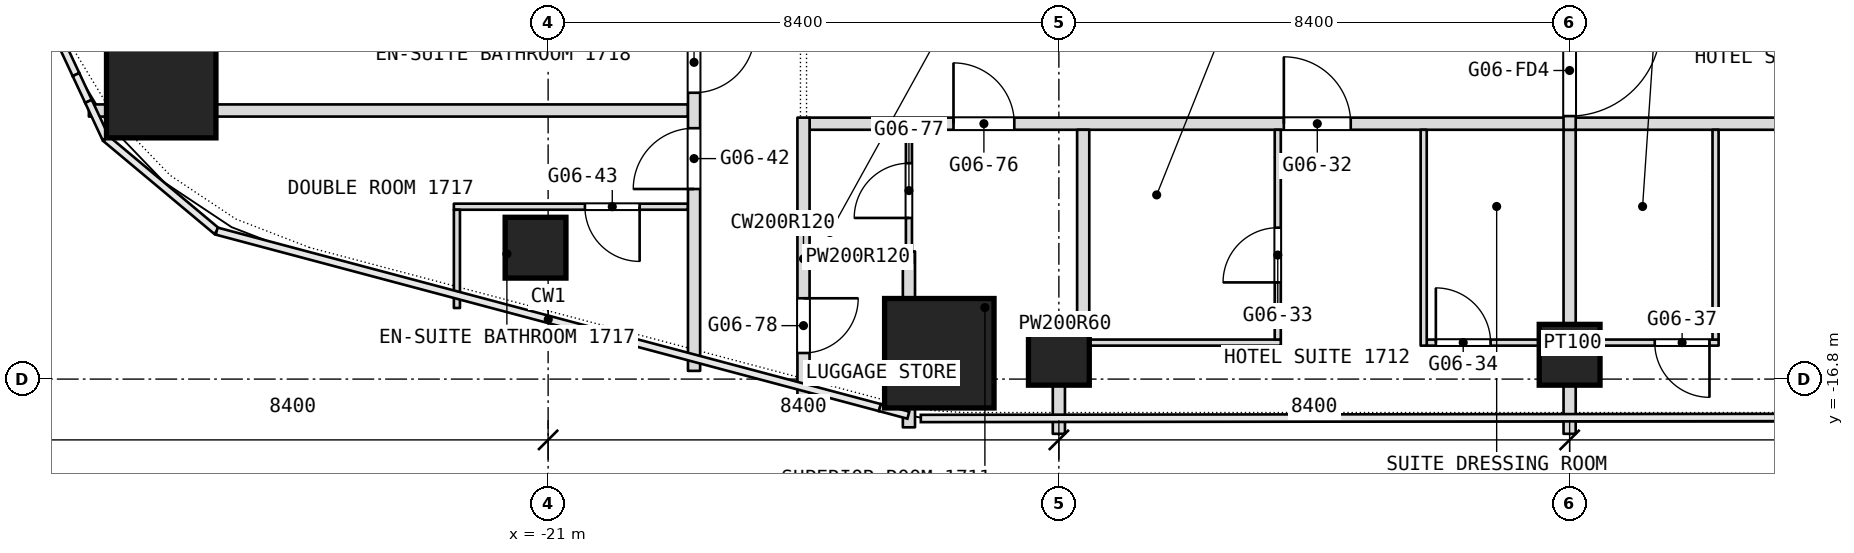
"""IFC4 building model, lengths in metres.
Left out: names, types, materials, properties, quantities, classifications, styles, units other than length and angle.
Written with IfcOpenShell. Run it as: python <this file> out.ifc"""

import sys

from ifc_helpers import new_model, si_unit, direction, frame, frame_2d, origin, origin_2d, place, context, subcontext, project, spatial, rectangle, extrude, element, fill, save


model = new_model("IFC4")
c1 = context("Model", 3, precision=1e-05, world=origin(), true_north=direction((0.0, 1.0)))
c2 = subcontext(c1, "Body", "Model", "MODEL_VIEW")
j1 = project(units=[si_unit("LENGTHUNIT", "METRE"), si_unit("PLANEANGLEUNIT", "RADIAN")], contexts=[c1])
p1 = place(None, origin())
s1 = spatial("IfcSite", under=j1, at=p1, CompositionType="ELEMENT")
p2 = place(p1, origin())
s2 = spatial("IfcBuilding", under=s1, at=p2, CompositionType="ELEMENT")
p3 = place(p2, frame((0.0, 0.0, 76.1)))
s3 = spatial("IfcBuildingStorey", under=s2, at=p3, CompositionType="ELEMENT", Elevation=76.1)
for number, where, z_axis, x_axis in (
    (1, (-27.363, -11.933, 0.0), (0.0, 0.0, 1.0), (1.0, 0.0, 0.0)),
    (2, (-14.566, -16.375, 0.0), (0.0, 0.0, 1.0), (1.0, 0.0, 0.0)),
):
    element("IfcColumn", number, at=place(p3, frame(where, z_axis=z_axis, x_axis=x_axis)), inside=s3, PredefinedType="COLUMN", context=c2, shape_type="SweptSolid", body=[
        extrude(rectangle(XDim=1.8, YDim=1.8, at=origin_2d()), origin(), (0.0, 0.0, 1.0), 3.6),
    ])
for number, where, z_axis, x_axis in (
    (3, (-4.2, -16.4, 0.0), (0.0, 0.0, 1.0), (1.0, 0.0, 0.0)),
    (4, (-12.6, -16.4, 0.0), (0.0, 0.0, 1.0), (1.0, 0.0, 0.0)),
    (5, (-21.207, -14.639, 0.0), (0.0, 0.0, 1.0), (1.0, 0.0, 0.0)),
):
    element("IfcColumn", number, at=place(p3, frame(where, z_axis=z_axis, x_axis=x_axis)), inside=s3, PredefinedType="COLUMN", context=c2, shape_type="SweptSolid", body=[
        extrude(rectangle(XDim=1.0, YDim=1.0, at=origin_2d()), origin(), (0.0, 0.0, 1.0), 3.6),
    ])
p4 = place(p3, frame((-12.5, -16.2, 0.0), z_axis=(0.0, 0.0, 1.0), x_axis=(1.0, 0.0, 0.0)))
e6 = element("IfcWall", 6, at=p4, inside=s3, PredefinedType="PARTITIONING", context=c2, shape_type="SweptSolid", body=[
    extrude(rectangle(XDim=3.55, YDim=0.1, at=frame_2d((1.775, 0.0))), origin(), (0.0, 0.0, 1.0), 2.94),
])
p5 = place(p3, frame((-6.55, -16.2, 0.0), z_axis=(0.0, 0.0, 1.0), x_axis=(1.0, 0.0, 0.0)))
e7 = element("IfcWall", 7, at=p5, inside=s3, PredefinedType="PARTITIONING", context=c2, shape_type="SweptSolid", body=[
    extrude(rectangle(XDim=4.8, YDim=0.1, at=frame_2d((2.4, 0.0))), origin(), (0.0, 0.0, 1.0), 2.94),
])
p6 = place(p5, frame((0.15, 0.0, 0.0)))
e8 = element("IfcOpeningElement", 8, at=p6, cuts=e7, PredefinedType="OPENING", context=c2, shape_type="SweptSolid", body=[
    extrude(rectangle(XDim=0.9, YDim=2.1, at=frame_2d((0.45, 1.05))), frame((0.0, 0.05, 0.0), z_axis=(0.0, -1.0, 0.0), x_axis=(1.0, 0.0, 0.0)), (0.0, 0.0, 1.0), 0.1),
])
p7 = place(p5, frame((3.75, 0.0, 0.0)))
e9 = element("IfcOpeningElement", 9, at=p7, cuts=e7, PredefinedType="OPENING", context=c2, shape_type="SweptSolid", body=[
    extrude(rectangle(XDim=0.9, YDim=2.1, at=frame_2d((0.45, 1.05))), frame((0.0, 0.05, 0.0), z_axis=(0.0, -1.0, 0.0), x_axis=(1.0, 0.0, 0.0)), (0.0, 0.0, 1.0), 0.1),
])
p8 = place(p3, frame((-12.7, -15.9, 0.0), z_axis=(0.0, 0.0, 1.0), x_axis=(1.0, 0.0, 0.0)))
e10 = element("IfcWall", 10, at=p8, inside=s3, PredefinedType="PARTITIONING", context=c2, shape_type="SweptSolid", body=[
    extrude(rectangle(XDim=0.4, YDim=0.2, at=frame_2d((0.2, 0.0))), origin(), (0.0, 0.0, 1.0), 3.34),
])
p9 = place(p3, frame((-16.7, -14.8, 0.0), z_axis=(0.0, 0.0, 1.0), x_axis=(1.0, 0.0, 0.0)))
e11 = element("IfcWall", 11, at=p9, inside=s3, PredefinedType="PARTITIONING", context=c2, shape_type="SweptSolid", body=[
    extrude(rectangle(XDim=1.584, YDim=0.2, at=frame_2d((0.792, 0.0))), origin(), (0.0, 0.0, 1.0), 3.34),
])
p10 = place(p3, frame((-22.55, -13.965, 0.0), z_axis=(0.0, 0.0, 1.0), x_axis=(1.0, 0.0, 0.0)))
e12 = element("IfcWall", 12, at=p10, inside=s3, PredefinedType="PARTITIONING", context=c2, shape_type="SweptSolid", body=[
    extrude(rectangle(XDim=3.85, YDim=0.1, at=frame_2d((1.925, 0.0))), origin(), (0.0, 0.0, 1.0), 3.34),
])
p11 = place(p10, frame((2.155, 0.0, 0.0)))
e13 = element("IfcOpeningElement", 13, at=p11, cuts=e12, PredefinedType="OPENING", context=c2, shape_type="SweptSolid", body=[
    extrude(rectangle(XDim=0.9, YDim=2.1, at=frame_2d((0.45, 1.05))), frame((0.0, 0.05, 0.0), z_axis=(0.0, -1.0, 0.0), x_axis=(1.0, 0.0, 0.0)), (0.0, 0.0, 1.0), 0.1),
])
p12 = place(p3, frame((-16.7, -12.6, 0.0), z_axis=(0.0, 0.0, 1.0), x_axis=(1.0, 0.0, 0.0)))
e14 = element("IfcWall", 14, at=p12, inside=s3, PredefinedType="PARTITIONING", context=c2, shape_type="SweptSolid", body=[
    extrude(rectangle(XDim=33.4, YDim=0.2, at=frame_2d((16.7, 0.0))), origin(), (0.0, 0.0, 1.0), 3.34),
])
p13 = place(p12, frame((7.8, 0.0, 0.0)))
e15 = element("IfcOpeningElement", 15, at=p13, cuts=e14, PredefinedType="OPENING", context=c2, shape_type="SweptSolid", body=[
    extrude(rectangle(XDim=1.1, YDim=2.1, at=frame_2d((0.55, 1.05))), frame((0.0, 0.1, 0.0), z_axis=(0.0, -1.0, 0.0), x_axis=(1.0, 0.0, 0.0)), (0.0, 0.0, 1.0), 0.2),
])
p14 = place(p12, frame((16.1, 0.0, 0.0)))
e16 = element("IfcOpeningElement", 16, at=p14, cuts=e14, PredefinedType="OPENING", context=c2, shape_type="SweptSolid", body=[
    extrude(rectangle(XDim=1.1, YDim=2.1, at=frame_2d((0.55, 1.05))), frame((0.0, 0.1, 0.0), z_axis=(0.0, -1.0, 0.0), x_axis=(1.0, 0.0, 0.0)), (0.0, 0.0, 1.0), 0.2),
])
p15 = place(p12, frame((23.7, 0.0, 0.0)))
e17 = element("IfcOpeningElement", 17, at=p15, cuts=e14, PredefinedType="OPENING", context=c2, shape_type="SweptSolid", body=[
    extrude(rectangle(XDim=1.0, YDim=2.1, at=frame_2d((0.5, 1.05))), frame((0.0, 0.1, 0.0), z_axis=(0.0, -1.0, 0.0), x_axis=(1.0, 0.0, 0.0)), (0.0, 0.0, 1.0), 0.2),
])
p16 = place(p12, frame((25.5, 0.0, 0.0)))
e18 = element("IfcOpeningElement", 18, at=p16, cuts=e14, PredefinedType="OPENING", context=c2, shape_type="SweptSolid", body=[
    extrude(rectangle(XDim=1.0, YDim=2.1, at=frame_2d((0.5, 1.05))), frame((0.0, 0.1, 0.0), z_axis=(0.0, -1.0, 0.0), x_axis=(1.0, 0.0, 0.0)), (0.0, 0.0, 1.0), 0.2),
])
p17 = place(p12, frame((2.367, 0.0, 0.0)))
e19 = element("IfcOpeningElement", 19, at=p17, cuts=e14, PredefinedType="OPENING", context=c2, shape_type="SweptSolid", body=[
    extrude(rectangle(XDim=1.0, YDim=2.1, at=frame_2d((0.5, 1.05))), frame((0.0, 0.1, 0.0), z_axis=(0.0, -1.0, 0.0), x_axis=(1.0, 0.0, 0.0)), (0.0, 0.0, 1.0), 0.2),
])
p18 = place(p12, frame((30.083, 0.0, 0.0)))
e20 = element("IfcOpeningElement", 20, at=p18, cuts=e14, PredefinedType="OPENING", context=c2, shape_type="SweptSolid", body=[
    extrude(rectangle(XDim=1.0, YDim=2.1, at=frame_2d((0.5, 1.05))), frame((0.0, 0.1, 0.0), z_axis=(0.0, -1.0, 0.0), x_axis=(1.0, 0.0, 0.0)), (0.0, 0.0, 1.0), 0.2),
])
p19 = place(p3, frame((-28.553, -12.383, 0.0), z_axis=(0.0, 0.0, 1.0), x_axis=(1.0, 0.0, 0.0)))
e21 = element("IfcWall", 21, at=p19, inside=s3, PredefinedType="PARTITIONING", context=c2, shape_type="SweptSolid", body=[
    extrude(rectangle(XDim=0.29, YDim=0.2, at=frame_2d((0.145, 0.0))), origin(), (0.0, 0.0, 1.0), 3.34),
])
p20 = place(p3, frame((-26.463, -12.383, 0.0), z_axis=(0.0, 0.0, 1.0), x_axis=(1.0, 0.0, 0.0)))
e22 = element("IfcWall", 22, at=p20, inside=s3, PredefinedType="PARTITIONING", context=c2, shape_type="SweptSolid", body=[
    extrude(rectangle(XDim=7.763, YDim=0.2, at=frame_2d((3.881, 0.0))), origin(), (0.0, 0.0, 1.0), 3.34),
])
p21 = place(p3, frame((-1.8, -16.15, 0.0), z_axis=(0.0, 0.0, 1.0), x_axis=(0.0, 1.0, 0.0)))
e23 = element("IfcWall", 23, at=p21, inside=s3, PredefinedType="PARTITIONING", context=c2, shape_type="SweptSolid", body=[
    extrude(rectangle(XDim=3.45, YDim=0.1, at=frame_2d((1.725, 0.0))), origin(), (0.0, 0.0, 1.0), 3.34),
])
p22 = place(p3, frame((-4.2, -17.7, 0.0), z_axis=(0.0, 0.0, 1.0), x_axis=(0.0, 1.0, 0.0)))
e24 = element("IfcWall", 24, at=p22, inside=s3, PredefinedType="PARTITIONING", context=c2, shape_type="SweptSolid", body=[
    extrude(rectangle(XDim=5.0, YDim=0.2, at=frame_2d((2.5, 0.0))), origin(), (0.0, 0.0, 1.0), 3.34),
])
p23 = place(p3, frame((-4.2, -12.7, 0.0), z_axis=(0.0, 0.0, 1.0), x_axis=(0.0, 1.0, 0.0)))
e25 = element("IfcWall", 25, at=p23, inside=s3, PredefinedType="PARTITIONING", context=c2, shape_type="SweptSolid", body=[
    extrude(rectangle(XDim=12.7, YDim=0.2, at=frame_2d((6.35, 0.0))), origin(), (0.0, 0.0, 1.0), 3.34),
])
p24 = place(p23, frame((11.05, 0.0, 0.0)))
e26 = element("IfcOpeningElement", 26, at=p24, cuts=e25, PredefinedType="OPENING", context=c2, shape_type="SweptSolid", body=[
    extrude(rectangle(XDim=1.5, YDim=2.1, at=frame_2d((0.75, 1.05))), frame((0.0, 0.1, 0.0), z_axis=(0.0, -1.0, 0.0), x_axis=(1.0, 0.0, 0.0)), (0.0, 0.0, 1.0), 0.2),
])
p25 = place(p23, frame((0.225, 0.0, 0.0)))
e27 = element("IfcOpeningElement", 27, at=p25, cuts=e25, PredefinedType="OPENING", context=c2, shape_type="SweptSolid", body=[
    extrude(rectangle(XDim=1.5, YDim=2.1, at=frame_2d((0.75, 1.05))), frame((0.0, 0.1, 0.0), z_axis=(0.0, -1.0, 0.0), x_axis=(1.0, 0.0, 0.0)), (0.0, 0.0, 1.0), 0.2),
])
p26 = place(p3, frame((-6.6, -16.25, 0.0), z_axis=(0.0, 0.0, 1.0), x_axis=(0.0, 1.0, 0.0)))
e28 = element("IfcWall", 28, at=p26, inside=s3, PredefinedType="PARTITIONING", context=c2, shape_type="SweptSolid", body=[
    extrude(rectangle(XDim=3.55, YDim=0.1, at=frame_2d((1.775, 0.0))), origin(), (0.0, 0.0, 1.0), 3.34),
])
p27 = place(p3, frame((-9.0, -16.15, 0.0), z_axis=(0.0, 0.0, 1.0), x_axis=(0.0, 1.0, 0.0)))
e29 = element("IfcWall", 29, at=p27, inside=s3, PredefinedType="PARTITIONING", context=c2, shape_type="SweptSolid", body=[
    extrude(rectangle(XDim=3.45, YDim=0.1, at=frame_2d((1.725, 0.0))), origin(), (0.0, 0.0, 1.0), 3.34),
])
p28 = place(p27, frame((0.94, 0.0, 0.0)))
e30 = element("IfcOpeningElement", 30, at=p28, cuts=e29, PredefinedType="OPENING", context=c2, shape_type="SweptSolid", body=[
    extrude(rectangle(XDim=0.9, YDim=2.1, at=frame_2d((0.45, 1.05))), frame((0.0, 0.05, 0.0), z_axis=(0.0, -1.0, 0.0), x_axis=(1.0, 0.0, 0.0)), (0.0, 0.0, 1.0), 0.1),
])
p29 = place(p3, frame((-12.2, -16.0, 0.0), z_axis=(0.0, 0.0, 1.0), x_axis=(0.0, 1.0, 0.0)))
e31 = element("IfcWall", 31, at=p29, inside=s3, PredefinedType="PARTITIONING", context=c2, shape_type="SweptSolid", body=[
    extrude(rectangle(XDim=3.3, YDim=0.2, at=frame_2d((1.65, 0.0))), origin(), (0.0, 0.0, 1.0), 3.34),
])
p30 = place(p3, frame((-12.6, -17.7, 0.0), z_axis=(0.0, 0.0, 1.0), x_axis=(0.0, 1.0, 0.0)))
e32 = element("IfcWall", 32, at=p30, inside=s3, PredefinedType="PARTITIONING", context=c2, shape_type="SweptSolid", body=[
    extrude(rectangle(XDim=1.7, YDim=0.2, at=frame_2d((0.85, 0.0))), origin(), (0.0, 0.0, 1.0), 3.34),
])
p31 = place(p3, frame((-15.066, -17.593, 0.0), z_axis=(0.0, 0.0, 1.0), x_axis=(0.0, 1.0, 0.0)))
e33 = element("IfcWall", 33, at=p31, inside=s3, PredefinedType="PARTITIONING", context=c2, shape_type="SweptSolid", body=[
    extrude(rectangle(XDim=0.318, YDim=0.2, at=frame_2d((0.159, 0.0))), origin(), (0.0, 0.0, 1.0), 3.34),
])
p32 = place(p3, frame((-15.066, -15.475, 0.0), z_axis=(0.0, 0.0, 1.0), x_axis=(0.0, 1.0, 0.0)))
e34 = element("IfcWall", 34, at=p32, inside=s3, PredefinedType="PARTITIONING", context=c2, shape_type="SweptSolid", body=[
    extrude(rectangle(XDim=0.775, YDim=0.2, at=frame_2d((0.388, 0.0))), origin(), (0.0, 0.0, 1.0), 3.34),
])
p33 = place(p3, frame((-15.066, -14.9, 0.0), z_axis=(0.0, 0.0, 1.0), x_axis=(0.0, 1.0, 0.0)))
e35 = element("IfcWall", 35, at=p33, inside=s3, PredefinedType="PARTITIONING", context=c2, shape_type="SweptSolid", body=[
    extrude(rectangle(XDim=2.2, YDim=0.1, at=frame_2d((1.1, 0.0))), origin(), (0.0, 0.0, 1.0), 3.34),
])
p34 = place(p33, frame((0.75, 0.0, 0.0)))
e36 = element("IfcOpeningElement", 36, at=p34, cuts=e35, PredefinedType="OPENING", context=c2, shape_type="SweptSolid", body=[
    extrude(rectangle(XDim=0.9, YDim=2.1, at=frame_2d((0.45, 1.05))), frame((0.0, 0.05, 0.0), z_axis=(0.0, -1.0, 0.0), x_axis=(1.0, 0.0, 0.0)), (0.0, 0.0, 1.0), 0.1),
])
p35 = place(p3, frame((-16.8, -17.143, 0.0), z_axis=(0.0, 0.0, 1.0), x_axis=(0.0, 1.0, 0.0)))
e37 = element("IfcWall", 37, at=p35, inside=s3, PredefinedType="PARTITIONING", context=c2, shape_type="SweptSolid", body=[
    extrude(rectangle(XDim=4.643, YDim=0.2, at=frame_2d((2.322, 0.0))), origin(), (0.0, 0.0, 1.0), 3.34),
])
p36 = place(p35, frame((0.772, 0.0, 0.0)))
e38 = element("IfcOpeningElement", 38, at=p36, cuts=e37, PredefinedType="OPENING", context=c2, shape_type="SweptSolid", body=[
    extrude(rectangle(XDim=0.9, YDim=2.1, at=frame_2d((0.45, 1.05))), frame((0.0, 0.1, 0.0), z_axis=(0.0, -1.0, 0.0), x_axis=(1.0, 0.0, 0.0)), (0.0, 0.0, 1.0), 0.2),
])
p37 = place(p3, frame((-18.6, -16.665, 0.0), z_axis=(0.0, 0.0, 1.0), x_axis=(0.0, 1.0, 0.0)))
e39 = element("IfcWall", 39, at=p37, inside=s3, PredefinedType="PARTITIONING", context=c2, shape_type="SweptSolid", body=[
    extrude(rectangle(XDim=23.565, YDim=0.2, at=frame_2d((11.782, 0.0))), origin(), (0.0, 0.0, 1.0), 3.34),
])
p38 = place(p37, frame((2.991, 0.0, 0.0)))
e40 = element("IfcOpeningElement", 40, at=p38, cuts=e39, PredefinedType="OPENING", context=c2, shape_type="SweptSolid", body=[
    extrude(rectangle(XDim=1.0, YDim=2.1, at=frame_2d((0.5, 1.05))), frame((0.0, 0.1, 0.0), z_axis=(0.0, -1.0, 0.0), x_axis=(1.0, 0.0, 0.0)), (0.0, 0.0, 1.0), 0.2),
])
p39 = place(p37, frame((4.574, 0.0, 0.0)))
e41 = element("IfcOpeningElement", 41, at=p39, cuts=e39, PredefinedType="OPENING", context=c2, shape_type="SweptSolid", body=[
    extrude(rectangle(XDim=1.0, YDim=2.1, at=frame_2d((0.5, 1.05))), frame((0.0, 0.1, 0.0), z_axis=(0.0, -1.0, 0.0), x_axis=(1.0, 0.0, 0.0)), (0.0, 0.0, 1.0), 0.2),
])
p40 = place(p37, frame((8.665, 0.0, 0.0)))
e42 = element("IfcOpeningElement", 42, at=p40, cuts=e39, PredefinedType="OPENING", context=c2, shape_type="SweptSolid", body=[
    extrude(rectangle(XDim=1.0, YDim=2.1, at=frame_2d((0.5, 1.05))), frame((0.0, 0.1, 0.0), z_axis=(0.0, -1.0, 0.0), x_axis=(1.0, 0.0, 0.0)), (0.0, 0.0, 1.0), 0.2),
])
p41 = place(p37, frame((15.265, 0.0, 0.0)))
e43 = element("IfcOpeningElement", 43, at=p41, cuts=e39, PredefinedType="OPENING", context=c2, shape_type="SweptSolid", body=[
    extrude(rectangle(XDim=1.0, YDim=2.1, at=frame_2d((0.5, 1.05))), frame((0.0, 0.1, 0.0), z_axis=(0.0, -1.0, 0.0), x_axis=(1.0, 0.0, 0.0)), (0.0, 0.0, 1.0), 0.2),
])
p42 = place(p3, frame((-22.5, -15.631, 0.0), z_axis=(0.0, 0.0, 1.0), x_axis=(0.0, 1.0, 0.0)))
e44 = element("IfcWall", 44, at=p42, inside=s3, PredefinedType="PARTITIONING", context=c2, shape_type="SweptSolid", body=[
    extrude(rectangle(XDim=1.616, YDim=0.1, at=frame_2d((0.808, 0.0))), origin(), (0.0, 0.0, 1.0), 3.34),
])
p43 = place(p6, origin())
e45 = element("IfcDoor", 45, at=p43, inside=s3, OperationType="SINGLE_SWING_LEFT", PredefinedType="DOOR", context=c2, shape_type="SweptSolid", body=[
    extrude(rectangle(XDim=0.9, YDim=2.1, at=frame_2d((0.45, 1.05))), frame((0.0, 0.025, 0.0), z_axis=(0.0, -1.0, 0.0), x_axis=(1.0, 0.0, 0.0)), (0.0, 0.0, 1.0), 0.05),
])
fill(e8, e45)
p44 = place(p7, origin())
e46 = element("IfcDoor", 46, at=p44, inside=s3, OperationType="SINGLE_SWING_RIGHT", PredefinedType="DOOR", context=c2, shape_type="SweptSolid", body=[
    extrude(rectangle(XDim=0.9, YDim=2.1, at=frame_2d((0.45, 1.05))), frame((0.0, 0.025, 0.0), z_axis=(0.0, -1.0, 0.0), x_axis=(1.0, 0.0, 0.0)), (0.0, 0.0, 1.0), 0.05),
])
fill(e9, e46)
p45 = place(p11, origin())
e47 = element("IfcDoor", 47, at=p45, inside=s3, OperationType="SINGLE_SWING_RIGHT", PredefinedType="DOOR", context=c2, shape_type="SweptSolid", body=[
    extrude(rectangle(XDim=0.9, YDim=2.1, at=frame_2d((0.45, 1.05))), frame((0.0, 0.025, 0.0), z_axis=(0.0, -1.0, 0.0), x_axis=(1.0, 0.0, 0.0)), (0.0, 0.0, 1.0), 0.05),
])
fill(e13, e47)
p46 = place(p13, origin())
e48 = element("IfcDoor", 48, at=p46, inside=s3, OperationType="SINGLE_SWING_RIGHT", PredefinedType="DOOR", context=c2, shape_type="SweptSolid", body=[
    extrude(rectangle(XDim=1.1, YDim=2.1, at=frame_2d((0.55, 1.05))), frame((0.0, 0.025, 0.0), z_axis=(0.0, -1.0, 0.0), x_axis=(1.0, 0.0, 0.0)), (0.0, 0.0, 1.0), 0.05),
])
fill(e15, e48)
p47 = place(p17, origin())
e49 = element("IfcDoor", 49, at=p47, inside=s3, OperationType="SINGLE_SWING_RIGHT", PredefinedType="DOOR", context=c2, shape_type="SweptSolid", body=[
    extrude(rectangle(XDim=1.0, YDim=2.1, at=frame_2d((0.5, 1.05))), frame((0.0, 0.025, 0.0), z_axis=(0.0, -1.0, 0.0), x_axis=(1.0, 0.0, 0.0)), (0.0, 0.0, 1.0), 0.05),
])
fill(e19, e49)
p48 = place(p28, origin())
e50 = element("IfcDoor", 50, at=p48, inside=s3, OperationType="SINGLE_SWING_LEFT", PredefinedType="DOOR", context=c2, shape_type="SweptSolid", body=[
    extrude(rectangle(XDim=0.9, YDim=2.1, at=frame_2d((0.45, 1.05))), frame((0.0, 0.025, 0.0), z_axis=(0.0, -1.0, 0.0), x_axis=(1.0, 0.0, 0.0)), (0.0, 0.0, 1.0), 0.05),
])
fill(e30, e50)
p49 = place(p34, origin())
e51 = element("IfcDoor", 51, at=p49, inside=s3, OperationType="SINGLE_SWING_RIGHT", PredefinedType="DOOR", context=c2, shape_type="SweptSolid", body=[
    extrude(rectangle(XDim=0.9, YDim=2.1, at=frame_2d((0.45, 1.05))), frame((0.0, 0.025, 0.0), z_axis=(0.0, -1.0, 0.0), x_axis=(1.0, 0.0, 0.0)), (0.0, 0.0, 1.0), 0.05),
])
fill(e36, e51)
p50 = place(p36, origin())
e52 = element("IfcDoor", 52, at=p50, inside=s3, OperationType="SINGLE_SWING_LEFT", PredefinedType="DOOR", context=c2, shape_type="SweptSolid", body=[
    extrude(rectangle(XDim=0.9, YDim=2.1, at=frame_2d((0.45, 1.05))), frame((0.0, 0.025, 0.0), z_axis=(0.0, -1.0, 0.0), x_axis=(1.0, 0.0, 0.0)), (0.0, 0.0, 1.0), 0.05),
])
fill(e38, e52)
p51 = place(p38, origin())
e53 = element("IfcDoor", 53, at=p51, inside=s3, OperationType="SINGLE_SWING_LEFT", PredefinedType="DOOR", context=c2, shape_type="SweptSolid", body=[
    extrude(rectangle(XDim=1.0, YDim=2.1, at=frame_2d((0.5, 1.05))), frame((0.0, 0.025, 0.0), z_axis=(0.0, -1.0, 0.0), x_axis=(1.0, 0.0, 0.0)), (0.0, 0.0, 1.0), 0.05),
])
fill(e40, e53)
p52 = place(p39, origin())
e54 = element("IfcDoor", 54, at=p52, inside=s3, OperationType="SINGLE_SWING_LEFT", PredefinedType="DOOR", context=c2, shape_type="SweptSolid", body=[
    extrude(rectangle(XDim=1.0, YDim=2.1, at=frame_2d((0.5, 1.05))), frame((0.0, 0.025, 0.0), z_axis=(0.0, -1.0, 0.0), x_axis=(1.0, 0.0, 0.0)), (0.0, 0.0, 1.0), 0.05),
])
fill(e41, e54)
p53 = place(p25, origin())
e55 = element("IfcDoor", 55, at=p53, inside=s3, OperationType="DOUBLE_DOOR_DOUBLE_SWING", PredefinedType="DOOR", context=c2, shape_type="SweptSolid", body=[
    extrude(rectangle(XDim=1.5, YDim=2.1, at=frame_2d((0.75, 1.05))), frame((0.0, 0.025, 0.0), z_axis=(0.0, -1.0, 0.0), x_axis=(1.0, 0.0, 0.0)), (0.0, 0.0, 1.0), 0.05),
])
fill(e27, e55)
save(model, sys.argv[1])
